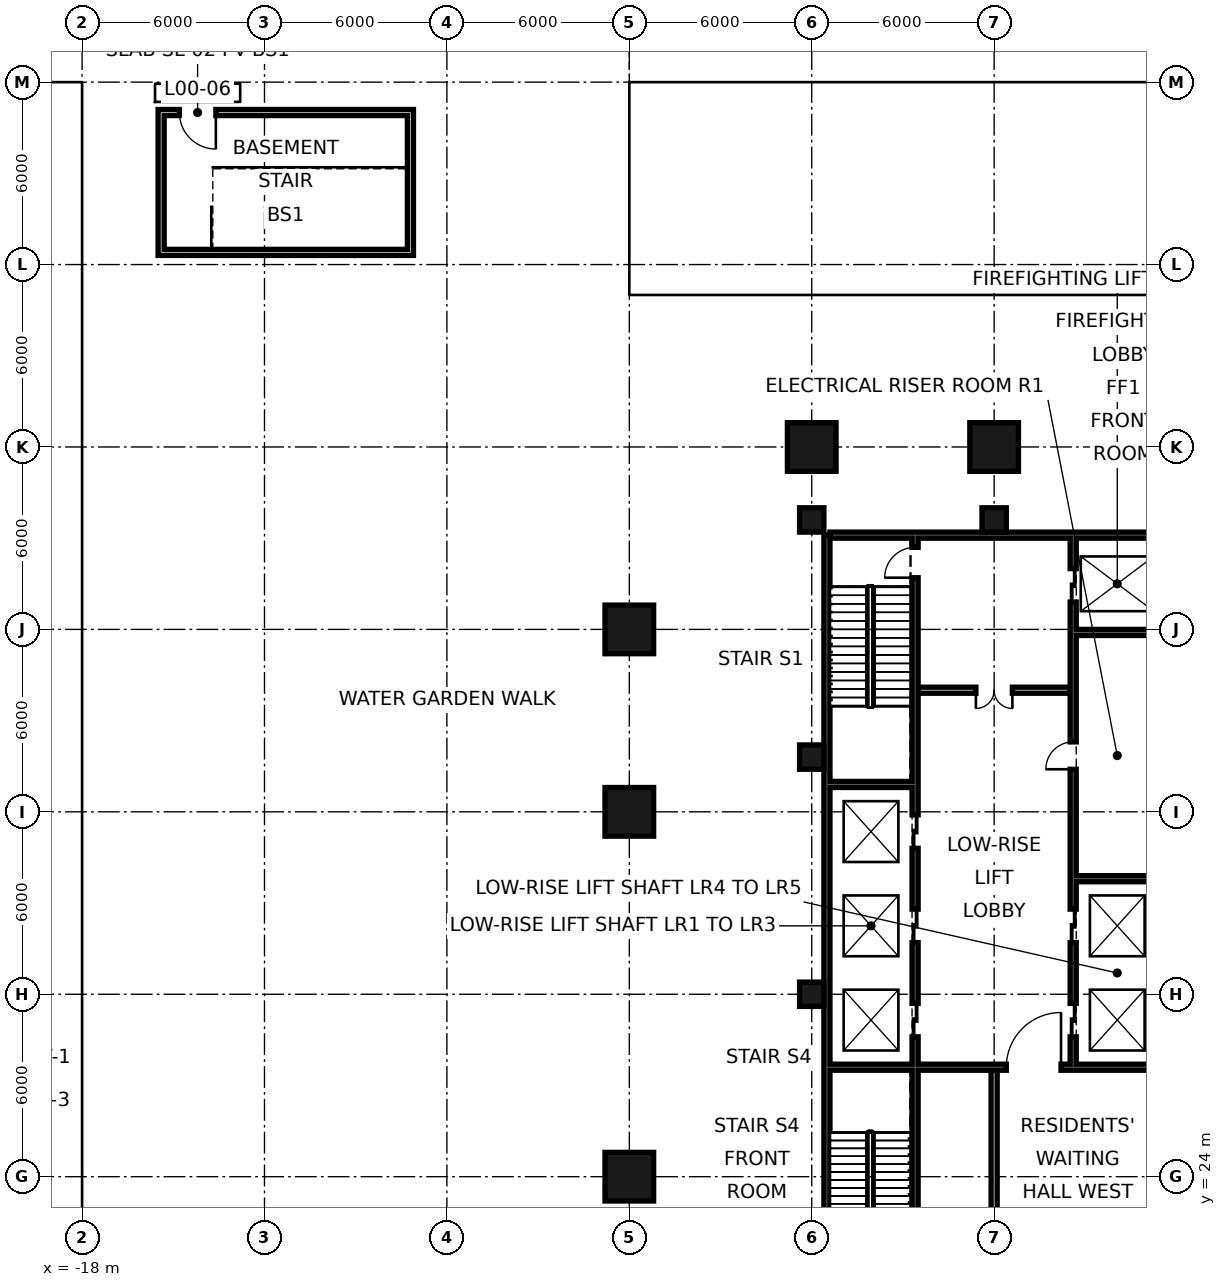
"""IFC4 building model, lengths in metres.
Left out: names, types, materials, properties, quantities, classifications, styles, units other than length and angle.
Written with IfcOpenShell. Run it as: python <this file> out.ifc"""

import sys

from ifc_helpers import new_model, si_unit, direction, frame, frame_2d, origin, origin_2d, place, context, subcontext, project, spatial, rectangle, hollow_rectangle, extrude, element, fill, save


model = new_model("IFC4")
c1 = context("Model", 3, precision=1e-05, world=origin(), true_north=direction((0.0, 1.0)))
c2 = subcontext(c1, "Body", "Model", "MODEL_VIEW")
j1 = project(units=[si_unit("LENGTHUNIT", "METRE"), si_unit("PLANEANGLEUNIT", "RADIAN")], contexts=[c1])
p1 = place(None, origin())
s1 = spatial("IfcSite", under=j1, at=p1, CompositionType="ELEMENT")
p2 = place(p1, origin())
s2 = spatial("IfcBuilding", under=s1, at=p2, CompositionType="ELEMENT")
p3 = place(p2, origin())
s3 = spatial("IfcBuildingStorey", under=s2, at=p3, CompositionType="ELEMENT", Elevation=0.0)
for number, where, z_axis, x_axis in (
    (1, (0.0, 24.0, 0.0), (0.0, 0.0, 1.0), (1.0, 0.0, 0.0)),
    (2, (0.0, 36.0, 0.0), (0.0, 0.0, 1.0), (1.0, 0.0, 0.0)),
):
    element("IfcColumn", number, at=place(p3, frame(where, z_axis=z_axis, x_axis=x_axis)), inside=s3, PredefinedType="COLUMN", context=c2, shape_type="SweptSolid", body=[
        extrude(hollow_rectangle(XDim=1.6, YDim=1.6, WallThickness=0.07, at=origin_2d()), origin(), (0.0, 0.0, 1.0), 15.0),
    ])
p4 = place(p3, frame((0.0, 42.0, -0.36), z_axis=(0.0, 0.0, 1.0), x_axis=(1.0, 0.0, 0.0)))
e3 = element("IfcColumn", 3, at=p4, inside=s3, PredefinedType="COLUMN", context=c2, shape_type="SweptSolid", body=[
    extrude(hollow_rectangle(XDim=1.6, YDim=1.6, WallThickness=0.07, at=origin_2d()), origin(), (0.0, 0.0, 1.0), 15.36),
])
for number, where, z_axis, x_axis in (
    (4, (6.0, 30.0, 0.0), (0.0, 0.0, 1.0), (1.0, 0.0, 0.0)),
    (5, (6.0, 37.8, 0.0), (0.0, 0.0, 1.0), (1.0, 0.0, 0.0)),
    (6, (6.0, 45.6, 0.0), (0.0, 0.0, 1.0), (1.0, 0.0, 0.0)),
):
    element("IfcColumn", number, at=place(p3, frame(where, z_axis=z_axis, x_axis=x_axis)), inside=s3, PredefinedType="COLUMN", context=c2, shape_type="SweptSolid", body=[
        extrude(hollow_rectangle(XDim=0.8, YDim=0.8, WallThickness=0.07, at=origin_2d()), origin(), (0.0, 0.0, 1.0), 15.0),
    ])
p5 = place(p3, frame((6.0, 48.0, -0.36), z_axis=(0.0, 0.0, 1.0), x_axis=(1.0, 0.0, 0.0)))
e7 = element("IfcColumn", 7, at=p5, inside=s3, PredefinedType="COLUMN", context=c2, shape_type="SweptSolid", body=[
    extrude(hollow_rectangle(XDim=1.6, YDim=1.6, WallThickness=0.07, at=origin_2d()), origin(), (0.0, 0.0, 1.0), 15.36),
])
p6 = place(p3, frame((12.0, 45.6, 0.0), z_axis=(0.0, 0.0, 1.0), x_axis=(1.0, 0.0, 0.0)))
e8 = element("IfcColumn", 8, at=p6, inside=s3, PredefinedType="COLUMN", context=c2, shape_type="SweptSolid", body=[
    extrude(hollow_rectangle(XDim=0.8, YDim=0.8, WallThickness=0.07, at=origin_2d()), origin(), (0.0, 0.0, 1.0), 15.0),
])
p7 = place(p3, frame((12.0, 48.0, 0.0), z_axis=(0.0, 0.0, 1.0), x_axis=(1.0, 0.0, 0.0)))
e9 = element("IfcColumn", 9, at=p7, inside=s3, PredefinedType="COLUMN", context=c2, shape_type="SweptSolid", body=[
    extrude(hollow_rectangle(XDim=1.6, YDim=1.6, WallThickness=0.07, at=origin_2d()), origin(), (0.0, 0.0, 1.0), 15.0),
])
for number, where, z_axis, x_axis in (
    (10, (-15.4, 54.3, 0.0), (0.0, 0.0, 1.0), (0.0, 1.0, 0.0)),
    (11, (-7.2, 54.3, 0.0), (0.0, 0.0, 1.0), (0.0, 1.0, 0.0)),
):
    element("IfcWall", number, at=place(p3, frame(where, z_axis=z_axis, x_axis=x_axis)), inside=s3, PredefinedType="SOLIDWALL", context=c2, shape_type="SweptSolid", body=[
        extrude(rectangle(XDim=4.8, YDim=0.2, at=frame_2d((2.4, 0.0))), origin(), (0.0, 0.0, 1.0), 14.55),
    ])
p8 = place(p3, frame((-15.3, 54.4, 0.0), z_axis=(0.0, 0.0, 1.0), x_axis=(1.0, 0.0, 0.0)))
e12 = element("IfcWall", 12, at=p8, inside=s3, PredefinedType="SOLIDWALL", context=c2, shape_type="SweptSolid", body=[
    extrude(rectangle(XDim=8.0, YDim=0.2, at=frame_2d((4.0, 0.0))), origin(), (0.0, 0.0, 1.0), 14.55),
])
p9 = place(p3, frame((-15.3, 59.0, 0.0), z_axis=(0.0, 0.0, 1.0), x_axis=(1.0, 0.0, 0.0)))
e13 = element("IfcWall", 13, at=p9, inside=s3, PredefinedType="SOLIDWALL", context=c2, shape_type="SweptSolid", body=[
    extrude(rectangle(XDim=8.0, YDim=0.2, at=frame_2d((4.0, 0.0))), origin(), (0.0, 0.0, 1.0), 14.55),
])
p10 = place(p9, frame((0.5, 0.0, 0.0)))
e14 = element("IfcOpeningElement", 14, at=p10, cuts=e13, PredefinedType="OPENING", context=c2, shape_type="SweptSolid", body=[
    extrude(rectangle(XDim=1.2, YDim=2.4, at=frame_2d((0.6, 1.2))), frame((0.0, 0.11, 0.0), z_axis=(0.0, -1.0, 0.0), x_axis=(1.0, 0.0, 0.0)), (0.0, 0.0, 1.0), 0.22),
])
p11 = place(p3, frame((6.5, 21.6, 0.0), z_axis=(0.0, 0.0, 1.0), x_axis=(0.0, 1.0, 0.0)))
e15 = element("IfcWall", 15, at=p11, inside=s3, PredefinedType="SOLIDWALL", context=c2, shape_type="SweptSolid", body=[
    extrude(rectangle(XDim=23.5, YDim=0.2, at=frame_2d((11.75, 0.0))), origin(), (0.0, 0.0, 1.0), 14.55),
])
p12 = place(p3, frame((6.6, 45.1, 0.0), z_axis=(0.0, 0.0, 1.0), x_axis=(1.0, 0.0, 0.0)))
e16 = element("IfcWall", 16, at=p12, inside=s3, PredefinedType="SOLIDWALL", context=c2, shape_type="SweptSolid", body=[
    extrude(rectangle(XDim=34.8, YDim=0.2, at=frame_2d((17.4, 0.0))), origin(), (0.0, 0.0, 1.0), 14.55),
])
p13 = place(p3, frame((12.0, 21.5, 0.0), z_axis=(0.0, 0.0, 1.0), x_axis=(0.0, 1.0, 0.0)))
e17 = element("IfcWall", 17, at=p13, inside=s3, PredefinedType="PARTITIONING", context=c2, shape_type="SweptSolid", body=[
    extrude(rectangle(XDim=6.0, YDim=0.2, at=frame_2d((3.0, 0.0))), origin(), (0.0, 0.0, 1.0), 13.85),
])
p14 = place(p3, frame((14.6, 27.7, 0.0), z_axis=(0.0, 0.0, 1.0), x_axis=(0.0, 1.0, 0.0)))
e18 = element("IfcWall", 18, at=p14, inside=s3, PredefinedType="SOLIDWALL", context=c2, shape_type="SweptSolid", body=[
    extrude(rectangle(XDim=17.3, YDim=0.2, at=frame_2d((8.65, 0.0))), origin(), (0.0, 0.0, 1.0), 14.55),
])
p15 = place(p14, frame((0.9, 0.0, 0.0)))
e19 = element("IfcOpeningElement", 19, at=p15, cuts=e18, PredefinedType="OPENING", context=c2, shape_type="SweptSolid", body=[
    extrude(rectangle(XDim=1.1, YDim=2.1, at=frame_2d((0.55, 1.05))), frame((0.0, 0.11, 0.0), z_axis=(0.0, -1.0, 0.0), x_axis=(1.0, 0.0, 0.0)), (0.0, 0.0, 1.0), 0.22),
])
p16 = place(p14, frame((4.0, 0.0, 0.0)))
e20 = element("IfcOpeningElement", 20, at=p16, cuts=e18, PredefinedType="OPENING", context=c2, shape_type="SweptSolid", body=[
    extrude(rectangle(XDim=1.1, YDim=2.1, at=frame_2d((0.55, 1.05))), frame((0.0, 0.11, 0.0), z_axis=(0.0, -1.0, 0.0), x_axis=(1.0, 0.0, 0.0)), (0.0, 0.0, 1.0), 0.22),
])
p17 = place(p14, frame((15.2, 0.0, 0.0)))
e21 = element("IfcOpeningElement", 21, at=p17, cuts=e18, PredefinedType="OPENING", context=c2, shape_type="SweptSolid", body=[
    extrude(rectangle(XDim=1.1, YDim=2.1, at=frame_2d((0.55, 1.05))), frame((0.0, 0.11, 0.0), z_axis=(0.0, -1.0, 0.0), x_axis=(1.0, 0.0, 0.0)), (0.0, 0.0, 1.0), 0.22),
])
p18 = place(p14, frame((9.7, 0.0, 0.0)))
e22 = element("IfcOpeningElement", 22, at=p18, cuts=e18, PredefinedType="OPENING", context=c2, shape_type="SweptSolid", body=[
    extrude(rectangle(XDim=0.9, YDim=2.1, at=frame_2d((0.45, 1.05))), frame((0.0, 0.11, 0.0), z_axis=(0.0, -1.0, 0.0), x_axis=(1.0, 0.0, 0.0)), (0.0, 0.0, 1.0), 0.22),
])
p19 = place(p3, frame((9.4, 21.5, 0.0), z_axis=(0.0, 0.0, 1.0), x_axis=(0.0, 1.0, 0.0)))
e23 = element("IfcWall", 23, at=p19, inside=s3, PredefinedType="SOLIDWALL", context=c2, shape_type="SweptSolid", body=[
    extrude(rectangle(XDim=23.5, YDim=0.2, at=frame_2d((11.75, 0.0))), origin(), (0.0, 0.0, 1.0), 13.85),
])
p20 = place(p19, frame((7.1, 0.0, 0.0)))
e24 = element("IfcOpeningElement", 24, at=p20, cuts=e23, PredefinedType="OPENING", context=c2, shape_type="SweptSolid", body=[
    extrude(rectangle(XDim=1.1, YDim=2.1, at=frame_2d((0.55, 1.05))), frame((0.0, 0.11, 0.0), z_axis=(0.0, -1.0, 0.0), x_axis=(1.0, 0.0, 0.0)), (0.0, 0.0, 1.0), 0.22),
])
p21 = place(p19, frame((10.2, 0.0, 0.0)))
e25 = element("IfcOpeningElement", 25, at=p21, cuts=e23, PredefinedType="OPENING", context=c2, shape_type="SweptSolid", body=[
    extrude(rectangle(XDim=1.1, YDim=2.1, at=frame_2d((0.55, 1.05))), frame((0.0, 0.11, 0.0), z_axis=(0.0, -1.0, 0.0), x_axis=(1.0, 0.0, 0.0)), (0.0, 0.0, 1.0), 0.22),
])
p22 = place(p19, frame((13.3, 0.0, 0.0)))
e26 = element("IfcOpeningElement", 26, at=p22, cuts=e23, PredefinedType="OPENING", context=c2, shape_type="SweptSolid", body=[
    extrude(rectangle(XDim=1.1, YDim=2.1, at=frame_2d((0.55, 1.05))), frame((0.0, 0.11, 0.0), z_axis=(0.0, -1.0, 0.0), x_axis=(1.0, 0.0, 0.0)), (0.0, 0.0, 1.0), 0.22),
])
p23 = place(p19, frame((22.2, 0.0, 0.0)))
e27 = element("IfcOpeningElement", 27, at=p23, cuts=e23, PredefinedType="OPENING", context=c2, shape_type="SweptSolid", body=[
    extrude(rectangle(XDim=1.0, YDim=2.1, at=frame_2d((0.5, 1.05))), frame((0.0, 0.11, 0.0), z_axis=(0.0, -1.0, 0.0), x_axis=(1.0, 0.0, 0.0)), (0.0, 0.0, 1.0), 0.22),
])
p24 = place(p19, frame((0.275, 0.0, 0.0)))
e28 = element("IfcOpeningElement", 28, at=p24, cuts=e23, PredefinedType="OPENING", context=c2, shape_type="SweptSolid", body=[
    extrude(rectangle(XDim=0.9, YDim=2.1, at=frame_2d((0.45, 1.05))), frame((0.0, 0.11, 0.0), z_axis=(0.0, -1.0, 0.0), x_axis=(1.0, 0.0, 0.0)), (0.0, 0.0, 1.0), 0.22),
])
p25 = place(p3, frame((6.6, 27.6, 0.0), z_axis=(0.0, 0.0, 1.0), x_axis=(1.0, 0.0, 0.0)))
e29 = element("IfcWall", 29, at=p25, inside=s3, PredefinedType="SOLIDWALL", context=c2, shape_type="SweptSolid", body=[
    extrude(rectangle(XDim=10.8, YDim=0.2, at=frame_2d((5.4, 0.0))), origin(), (0.0, 0.0, 1.0), 14.55),
])
p26 = place(p25, frame((5.8, 0.0, 0.0)))
e30 = element("IfcOpeningElement", 30, at=p26, cuts=e29, PredefinedType="OPENING", context=c2, shape_type="SweptSolid", body=[
    extrude(rectangle(XDim=1.8, YDim=2.1, at=frame_2d((0.9, 1.05))), frame((0.0, 0.11, 0.0), z_axis=(0.0, -1.0, 0.0), x_axis=(1.0, 0.0, 0.0)), (0.0, 0.0, 1.0), 0.22),
])
for number, where, z_axis, x_axis in (
    (31, (14.7, 33.8, 0.0), (0.0, 0.0, 1.0), (1.0, 0.0, 0.0)),
    (32, (6.6, 36.9, 0.0), (0.0, 0.0, 1.0), (1.0, 0.0, 0.0)),
):
    element("IfcWall", number, at=place(p3, frame(where, z_axis=z_axis, x_axis=x_axis)), inside=s3, PredefinedType="SOLIDWALL", context=c2, shape_type="SweptSolid", body=[
        extrude(rectangle(XDim=2.7, YDim=0.2, at=frame_2d((1.35, 0.0))), origin(), (0.0, 0.0, 1.0), 14.55),
    ])
p27 = place(p3, frame((9.5, 40.0, 0.0), z_axis=(0.0, 0.0, 1.0), x_axis=(1.0, 0.0, 0.0)))
e33 = element("IfcWall", 33, at=p27, inside=s3, PredefinedType="PARTITIONING", context=c2, shape_type="SweptSolid", body=[
    extrude(rectangle(XDim=5.0, YDim=0.2, at=frame_2d((2.5, 0.0))), origin(), (0.0, 0.0, 1.0), 14.55),
])
p28 = place(p27, frame((1.9, 0.0, 0.0)))
e34 = element("IfcOpeningElement", 34, at=p28, cuts=e33, PredefinedType="OPENING", context=c2, shape_type="SweptSolid", body=[
    extrude(rectangle(XDim=1.2, YDim=2.1, at=frame_2d((0.6, 1.05))), frame((0.0, 0.11, 0.0), z_axis=(0.0, -1.0, 0.0), x_axis=(1.0, 0.0, 0.0)), (0.0, 0.0, 1.0), 0.22),
])
p29 = place(p3, frame((14.7, 41.9, 0.0), z_axis=(0.0, 0.0, 1.0), x_axis=(1.0, 0.0, 0.0)))
e35 = element("IfcWall", 35, at=p29, inside=s3, PredefinedType="SOLIDWALL", context=c2, shape_type="SweptSolid", body=[
    extrude(rectangle(XDim=2.7, YDim=0.2, at=frame_2d((1.35, 0.0))), origin(), (0.0, 0.0, 1.0), 14.55),
])
p30 = place(p10, origin())
e36 = element("IfcDoor", 36, at=p30, inside=s3, OperationType="SINGLE_SWING_RIGHT", PredefinedType="DOOR", context=c2, shape_type="SweptSolid", body=[
    extrude(rectangle(XDim=1.2, YDim=2.4, at=frame_2d((0.6, 1.2))), frame((0.0, 0.025, 0.0), z_axis=(0.0, -1.0, 0.0), x_axis=(1.0, 0.0, 0.0)), (0.0, 0.0, 1.0), 0.05),
])
fill(e14, e36)
p31 = place(p26, frame((1.8, 0.0, 0.0), z_axis=(0.0, 0.0, 1.0), x_axis=(-1.0, 0.0, 0.0)))
e37 = element("IfcDoor", 37, at=p31, inside=s3, OperationType="SINGLE_SWING_LEFT", PredefinedType="DOOR", context=c2, shape_type="SweptSolid", body=[
    extrude(rectangle(XDim=1.8, YDim=2.1, at=frame_2d((0.9, 1.05))), frame((0.0, 0.025, 0.0), z_axis=(0.0, -1.0, 0.0), x_axis=(1.0, 0.0, 0.0)), (0.0, 0.0, 1.0), 0.05),
])
fill(e30, e37)
p32 = place(p28, frame((1.2, 0.0, 0.0), z_axis=(0.0, 0.0, 1.0), x_axis=(-1.0, 0.0, 0.0)))
e38 = element("IfcDoor", 38, at=p32, inside=s3, OperationType="DOUBLE_DOOR_SINGLE_SWING", PredefinedType="DOOR", context=c2, shape_type="SweptSolid", body=[
    extrude(rectangle(XDim=1.2, YDim=2.1, at=frame_2d((0.6, 1.05))), frame((0.0, 0.025, 0.0), z_axis=(0.0, -1.0, 0.0), x_axis=(1.0, 0.0, 0.0)), (0.0, 0.0, 1.0), 0.05),
])
fill(e34, e38)
p33 = place(p15, origin())
e39 = element("IfcDoor", 39, at=p33, inside=s3, OperationType="DOUBLE_DOOR_SLIDING", PredefinedType="DOOR", context=c2, shape_type="SweptSolid", body=[
    extrude(rectangle(XDim=1.1, YDim=2.1, at=frame_2d((0.55, 1.05))), frame((0.0, 0.025, 0.0), z_axis=(0.0, -1.0, 0.0), x_axis=(1.0, 0.0, 0.0)), (0.0, 0.0, 1.0), 0.05),
])
fill(e19, e39)
p34 = place(p16, origin())
e40 = element("IfcDoor", 40, at=p34, inside=s3, OperationType="DOUBLE_DOOR_SLIDING", PredefinedType="DOOR", context=c2, shape_type="SweptSolid", body=[
    extrude(rectangle(XDim=1.1, YDim=2.1, at=frame_2d((0.55, 1.05))), frame((0.0, 0.025, 0.0), z_axis=(0.0, -1.0, 0.0), x_axis=(1.0, 0.0, 0.0)), (0.0, 0.0, 1.0), 0.05),
])
fill(e20, e40)
p35 = place(p17, origin())
e41 = element("IfcDoor", 41, at=p35, inside=s3, OperationType="DOUBLE_DOOR_SLIDING", PredefinedType="DOOR", context=c2, shape_type="SweptSolid", body=[
    extrude(rectangle(XDim=1.1, YDim=2.1, at=frame_2d((0.55, 1.05))), frame((0.0, 0.025, 0.0), z_axis=(0.0, -1.0, 0.0), x_axis=(1.0, 0.0, 0.0)), (0.0, 0.0, 1.0), 0.05),
])
fill(e21, e41)
p36 = place(p20, origin())
e42 = element("IfcDoor", 42, at=p36, inside=s3, OperationType="DOUBLE_DOOR_SLIDING", PredefinedType="DOOR", context=c2, shape_type="SweptSolid", body=[
    extrude(rectangle(XDim=1.1, YDim=2.1, at=frame_2d((0.55, 1.05))), frame((0.0, 0.025, 0.0), z_axis=(0.0, -1.0, 0.0), x_axis=(1.0, 0.0, 0.0)), (0.0, 0.0, 1.0), 0.05),
])
fill(e24, e42)
p37 = place(p21, origin())
e43 = element("IfcDoor", 43, at=p37, inside=s3, OperationType="DOUBLE_DOOR_SLIDING", PredefinedType="DOOR", context=c2, shape_type="SweptSolid", body=[
    extrude(rectangle(XDim=1.1, YDim=2.1, at=frame_2d((0.55, 1.05))), frame((0.0, 0.025, 0.0), z_axis=(0.0, -1.0, 0.0), x_axis=(1.0, 0.0, 0.0)), (0.0, 0.0, 1.0), 0.05),
])
fill(e25, e43)
p38 = place(p22, origin())
e44 = element("IfcDoor", 44, at=p38, inside=s3, OperationType="DOUBLE_DOOR_SLIDING", PredefinedType="DOOR", context=c2, shape_type="SweptSolid", body=[
    extrude(rectangle(XDim=1.1, YDim=2.1, at=frame_2d((0.55, 1.05))), frame((0.0, 0.025, 0.0), z_axis=(0.0, -1.0, 0.0), x_axis=(1.0, 0.0, 0.0)), (0.0, 0.0, 1.0), 0.05),
])
fill(e26, e44)
p39 = place(p23, origin())
e45 = element("IfcDoor", 45, at=p39, inside=s3, OperationType="SINGLE_SWING_LEFT", PredefinedType="DOOR", context=c2, shape_type="SweptSolid", body=[
    extrude(rectangle(XDim=1.0, YDim=2.1, at=frame_2d((0.5, 1.05))), frame((0.0, 0.025, 0.0), z_axis=(0.0, -1.0, 0.0), x_axis=(1.0, 0.0, 0.0)), (0.0, 0.0, 1.0), 0.05),
])
fill(e27, e45)
p40 = place(p18, origin())
e46 = element("IfcDoor", 46, at=p40, inside=s3, OperationType="SINGLE_SWING_LEFT", PredefinedType="DOOR", context=c2, shape_type="SweptSolid", body=[
    extrude(rectangle(XDim=0.9, YDim=2.1, at=frame_2d((0.45, 1.05))), frame((0.0, 0.025, 0.0), z_axis=(0.0, -1.0, 0.0), x_axis=(1.0, 0.0, 0.0)), (0.0, 0.0, 1.0), 0.05),
])
fill(e22, e46)
save(model, sys.argv[1])
